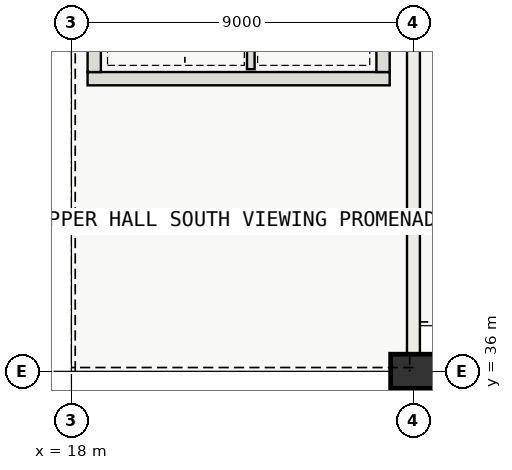
"""IFC4 building model, lengths in metres.
Left out: names, types, materials, properties, quantities, classifications, styles, units other than length and angle.
Written with IfcOpenShell. Run it as: python <this file> out.ifc"""

import sys

from ifc_helpers import new_model, si_unit, direction, frame, frame_2d, origin, origin_2d, place, context, subcontext, project, spatial, rectangle, extrude, element, save


model = new_model("IFC4")
c1 = context("Model", 3, precision=1e-05, world=origin(), true_north=direction((0.0, 1.0)))
c2 = subcontext(c1, "Body", "Model", "MODEL_VIEW")
j1 = project(units=[si_unit("LENGTHUNIT", "METRE"), si_unit("PLANEANGLEUNIT", "RADIAN")], contexts=[c1])
p1 = place(None, origin())
s1 = spatial("IfcSite", under=j1, at=p1, CompositionType="ELEMENT")
p2 = place(p1, origin())
s2 = spatial("IfcBuilding", under=s1, at=p2, CompositionType="ELEMENT")
p3 = place(p2, frame((0.0, 0.0, 12.0)))
s3 = spatial("IfcBuildingStorey", under=s2, at=p3, CompositionType="ELEMENT", Elevation=12.0)
p4 = place(p3, frame((18.425, 43.7, 0.0), z_axis=(0.0, 0.0, 1.0), x_axis=(1.0, 0.0, 0.0)))
e1 = element("IfcWall", 1, at=p4, inside=s3, PredefinedType="SHEAR", context=c2, shape_type="SweptSolid", body=[
    extrude(rectangle(XDim=7.95, YDim=0.35, at=frame_2d((3.975, 0.0))), origin(), (0.0, 0.0, 1.0), 4.8),
])
for number, where, z_axis, x_axis in (
    (2, (18.6, 43.875, 0.0), (0.0, 0.0, 1.0), (0.0, 1.0, 0.0)),
    (3, (26.2, 43.875, 0.0), (0.0, 0.0, 1.0), (0.0, 1.0, 0.0)),
):
    element("IfcWall", number, at=place(p3, frame(where, z_axis=z_axis, x_axis=x_axis)), inside=s3, PredefinedType="SHEAR", context=c2, shape_type="SweptSolid", body=[
        extrude(rectangle(XDim=11.25, YDim=0.35, at=frame_2d((5.625, 0.0))), origin(), (0.0, 0.0, 1.0), 4.8),
    ])
p5 = place(p3, frame((27.0, 36.0, 0.0), z_axis=(0.0, 0.0, 1.0), x_axis=(1.0, 0.0, 0.0)))
e4 = element("IfcColumn", 4, at=p5, inside=s3, PredefinedType="COLUMN", context=c2, shape_type="SweptSolid", body=[
    extrude(rectangle(XDim=1.2, YDim=0.9, at=origin_2d()), origin(), (0.0, 0.0, 1.0), 4.8),
])
p6 = place(p3, frame((27.0, 44.551, 0.0), z_axis=(0.0, 0.0, 1.0), x_axis=(0.0, -1.0, 0.0)))
e5 = element("IfcWall", 5, at=p6, inside=s3, PredefinedType="SOLIDWALL", context=c2, shape_type="SweptSolid", body=[
    extrude(rectangle(XDim=8.101, YDim=0.34, at=frame_2d((4.051, 0.0))), origin(), (0.0, 0.0, 1.0), 3.54),
])
p7 = place(p3, frame((22.72, 43.95, 0.0), z_axis=(0.0, 0.0, 1.0), x_axis=(0.0, 1.0, 0.0)))
e6 = element("IfcWall", 6, at=p7, inside=s3, PredefinedType="SOLIDWALL", context=c2, shape_type="SweptSolid", body=[
    extrude(rectangle(XDim=8.0, YDim=0.2, at=frame_2d((4.0, 0.0))), origin(), (0.0, 0.0, 1.0), 4.8),
])
save(model, sys.argv[1])
